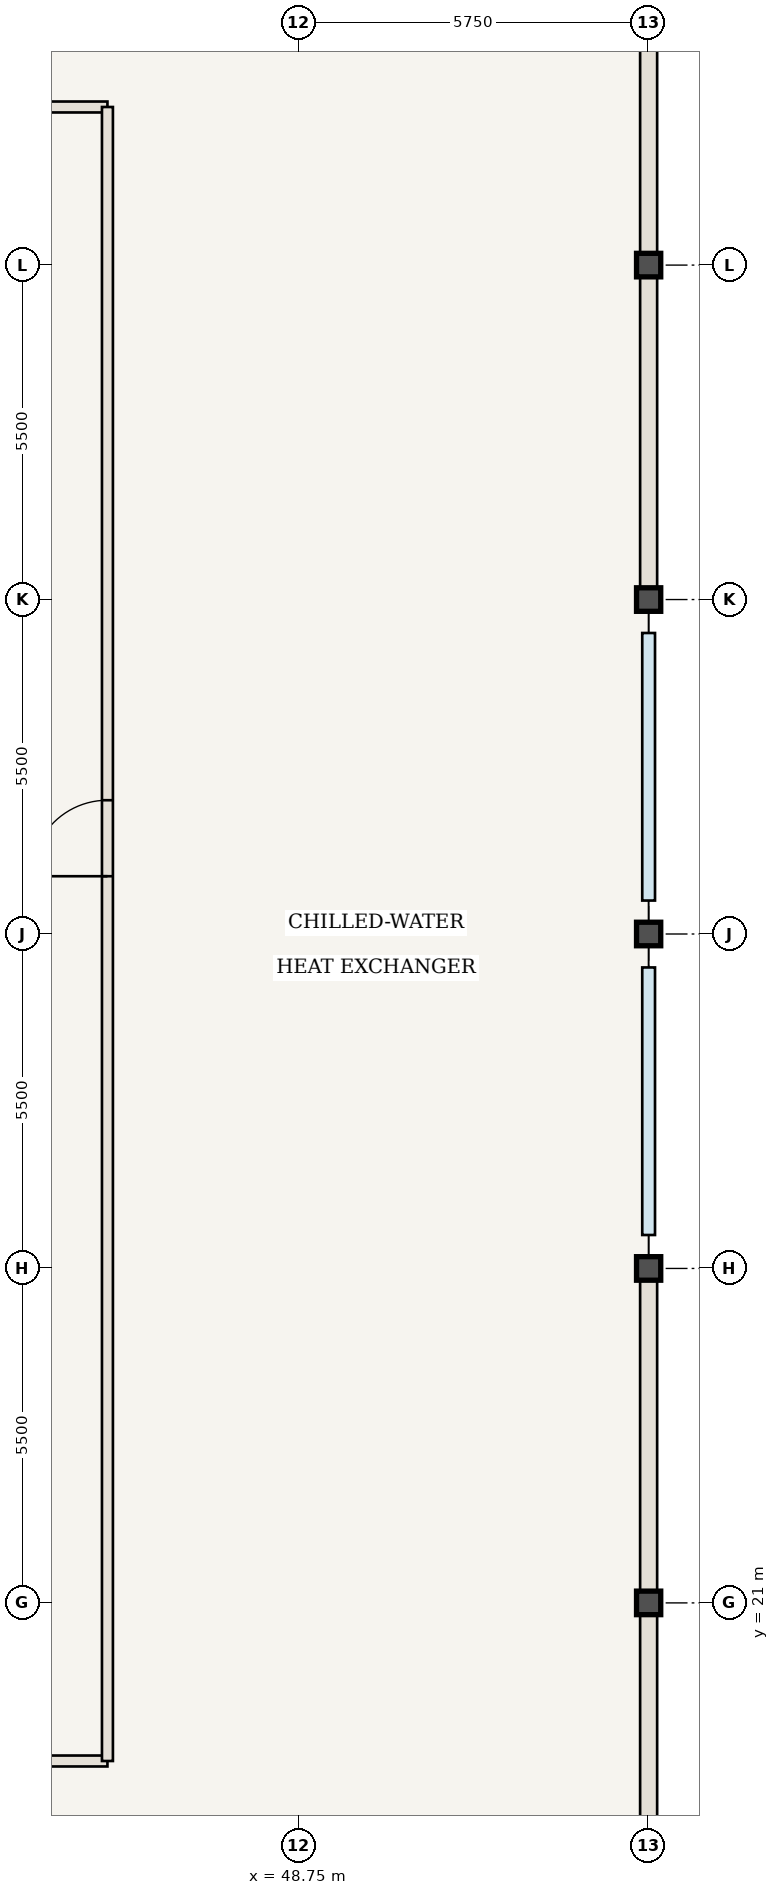
"""IFC4 building model, lengths in metres.
Left out: names, types, materials, properties, quantities, classifications, styles, units other than length and angle.
Written with IfcOpenShell. Run it as: python <this file> out.ifc"""

import sys

from ifc_helpers import new_model, si_unit, direction, frame, frame_2d, origin, origin_2d, place, context, subcontext, project, spatial, rectangle, i_section, extrude, element, fill, save


model = new_model("IFC4")
c1 = context("Model", 3, precision=1e-05, world=origin(), true_north=direction((0.0, 1.0)))
c2 = subcontext(c1, "Body", "Model", "MODEL_VIEW")
j1 = project(units=[si_unit("LENGTHUNIT", "METRE"), si_unit("PLANEANGLEUNIT", "RADIAN")], contexts=[c1])
p1 = place(None, origin())
s1 = spatial("IfcSite", under=j1, at=p1, CompositionType="ELEMENT")
p2 = place(p1, origin())
s2 = spatial("IfcBuilding", under=s1, at=p2, CompositionType="ELEMENT")
p3 = place(p2, frame((0.0, 0.0, 326.9)))
s3 = spatial("IfcBuildingStorey", under=s2, at=p3, CompositionType="ELEMENT", Elevation=326.9)
for number, where, z_axis, x_axis in (
    (1, (54.5, 21.0, 0.0), (0.0, 0.0, 1.0), (1.0, 0.0, 0.0)),
    (2, (54.5, 26.5, 0.0), (0.0, 0.0, 1.0), (1.0, 0.0, 0.0)),
    (3, (54.5, 32.0, 0.0), (0.0, 0.0, 1.0), (1.0, 0.0, 0.0)),
    (4, (54.5, 37.5, 0.0), (0.0, 0.0, 1.0), (1.0, 0.0, 0.0)),
    (5, (54.5, 43.0, 0.0), (0.0, 0.0, 1.0), (1.0, 0.0, 0.0)),
):
    element("IfcColumn", number, at=place(p3, frame(where, z_axis=z_axis, x_axis=x_axis)), inside=s3, PredefinedType="COLUMN", context=c2, shape_type="SweptSolid", body=[
        extrude(i_section(OverallWidth=0.398, OverallDepth=0.387, WebThickness=0.021, FlangeThickness=0.033, at=origin_2d()), origin(), (0.0, 0.0, 1.0), 4.55),
    ])
p4 = place(p3, frame((18.4, 18.4, 0.0), z_axis=(0.0, 0.0, 1.0), x_axis=(1.0, 0.0, 0.0)))
e6 = element("IfcWall", 6, at=p4, inside=s3, PredefinedType="STANDARD", context=c2, shape_type="SweptSolid", body=[
    extrude(rectangle(XDim=27.2, YDim=0.18, at=frame_2d((13.6, 0.0))), origin(), (0.0, 0.0, 1.0), 4.29),
])
p5 = place(p4, frame((4.4, 0.0, 0.0)))
e7 = element("IfcOpeningElement", 7, at=p5, cuts=e6, PredefinedType="OPENING", context=c2, shape_type="SweptSolid", body=[
    extrude(rectangle(XDim=1.25, YDim=2.2, at=frame_2d((0.625, 1.1))), frame((0.0, 0.1, 0.0), z_axis=(0.0, -1.0, 0.0), x_axis=(1.0, 0.0, 0.0)), (0.0, 0.0, 1.0), 0.2),
])
p6 = place(p3, frame((18.4, 45.6, 0.0), z_axis=(0.0, 0.0, 1.0), x_axis=(1.0, 0.0, 0.0)))
e8 = element("IfcWall", 8, at=p6, inside=s3, PredefinedType="STANDARD", context=c2, shape_type="SweptSolid", body=[
    extrude(rectangle(XDim=27.2, YDim=0.18, at=frame_2d((13.6, 0.0))), origin(), (0.0, 0.0, 1.0), 4.29),
])
p7 = place(p6, frame((4.4, 0.0, 0.0)))
e9 = element("IfcOpeningElement", 9, at=p7, cuts=e8, PredefinedType="OPENING", context=c2, shape_type="SweptSolid", body=[
    extrude(rectangle(XDim=1.25, YDim=2.2, at=frame_2d((0.625, 1.1))), frame((0.0, 0.1, 0.0), z_axis=(0.0, -1.0, 0.0), x_axis=(1.0, 0.0, 0.0)), (0.0, 0.0, 1.0), 0.2),
])
p8 = place(p3, frame((45.6, 18.4, 0.0), z_axis=(0.0, 0.0, 1.0), x_axis=(0.0, 1.0, 0.0)))
e10 = element("IfcWall", 10, at=p8, inside=s3, PredefinedType="STANDARD", context=c2, shape_type="SweptSolid", body=[
    extrude(rectangle(XDim=27.2, YDim=0.18, at=frame_2d((13.6, 0.0))), origin(), (0.0, 0.0, 1.0), 4.29),
])
p9 = place(p8, frame((14.55, 0.0, 0.0)))
e11 = element("IfcOpeningElement", 11, at=p9, cuts=e10, PredefinedType="OPENING", context=c2, shape_type="SweptSolid", body=[
    extrude(rectangle(XDim=1.25, YDim=2.2, at=frame_2d((0.625, 1.1))), frame((0.0, 0.1, 0.0), z_axis=(0.0, -1.0, 0.0), x_axis=(1.0, 0.0, 0.0)), (0.0, 0.0, 1.0), 0.2),
])
for number, where, z_axis, x_axis in (
    (12, (54.5, 21.0, 0.0), (0.0, 0.0, 1.0), (0.0, -1.0, 0.0)),
    (13, (54.5, 26.5, 0.0), (0.0, 0.0, 1.0), (0.0, -1.0, 0.0)),
    (14, (54.5, 43.0, 0.0), (0.0, 0.0, 1.0), (0.0, -1.0, 0.0)),
    (15, (54.5, 48.5, 0.0), (0.0, 0.0, 1.0), (0.0, -1.0, 0.0)),
):
    element("IfcWall", number, at=place(p3, frame(where, z_axis=z_axis, x_axis=x_axis)), inside=s3, PredefinedType="USERDEFINED", context=c2, shape_type="SweptSolid", body=[
        extrude(rectangle(XDim=5.5, YDim=0.28, at=frame_2d((2.75, 0.0))), origin(), (0.0, 0.0, 1.0), 3.57),
    ])
p10 = place(p9, origin())
e16 = element("IfcDoor", 16, at=p10, inside=s3, OperationType="SINGLE_SWING_LEFT", PredefinedType="DOOR", context=c2, shape_type="SweptSolid", body=[
    extrude(rectangle(XDim=1.25, YDim=2.2, at=frame_2d((0.625, 1.1))), frame((0.0, 0.025, 0.0), z_axis=(0.0, -1.0, 0.0), x_axis=(1.0, 0.0, 0.0)), (0.0, 0.0, 1.0), 0.05),
])
fill(e11, e16)
save(model, sys.argv[1])
